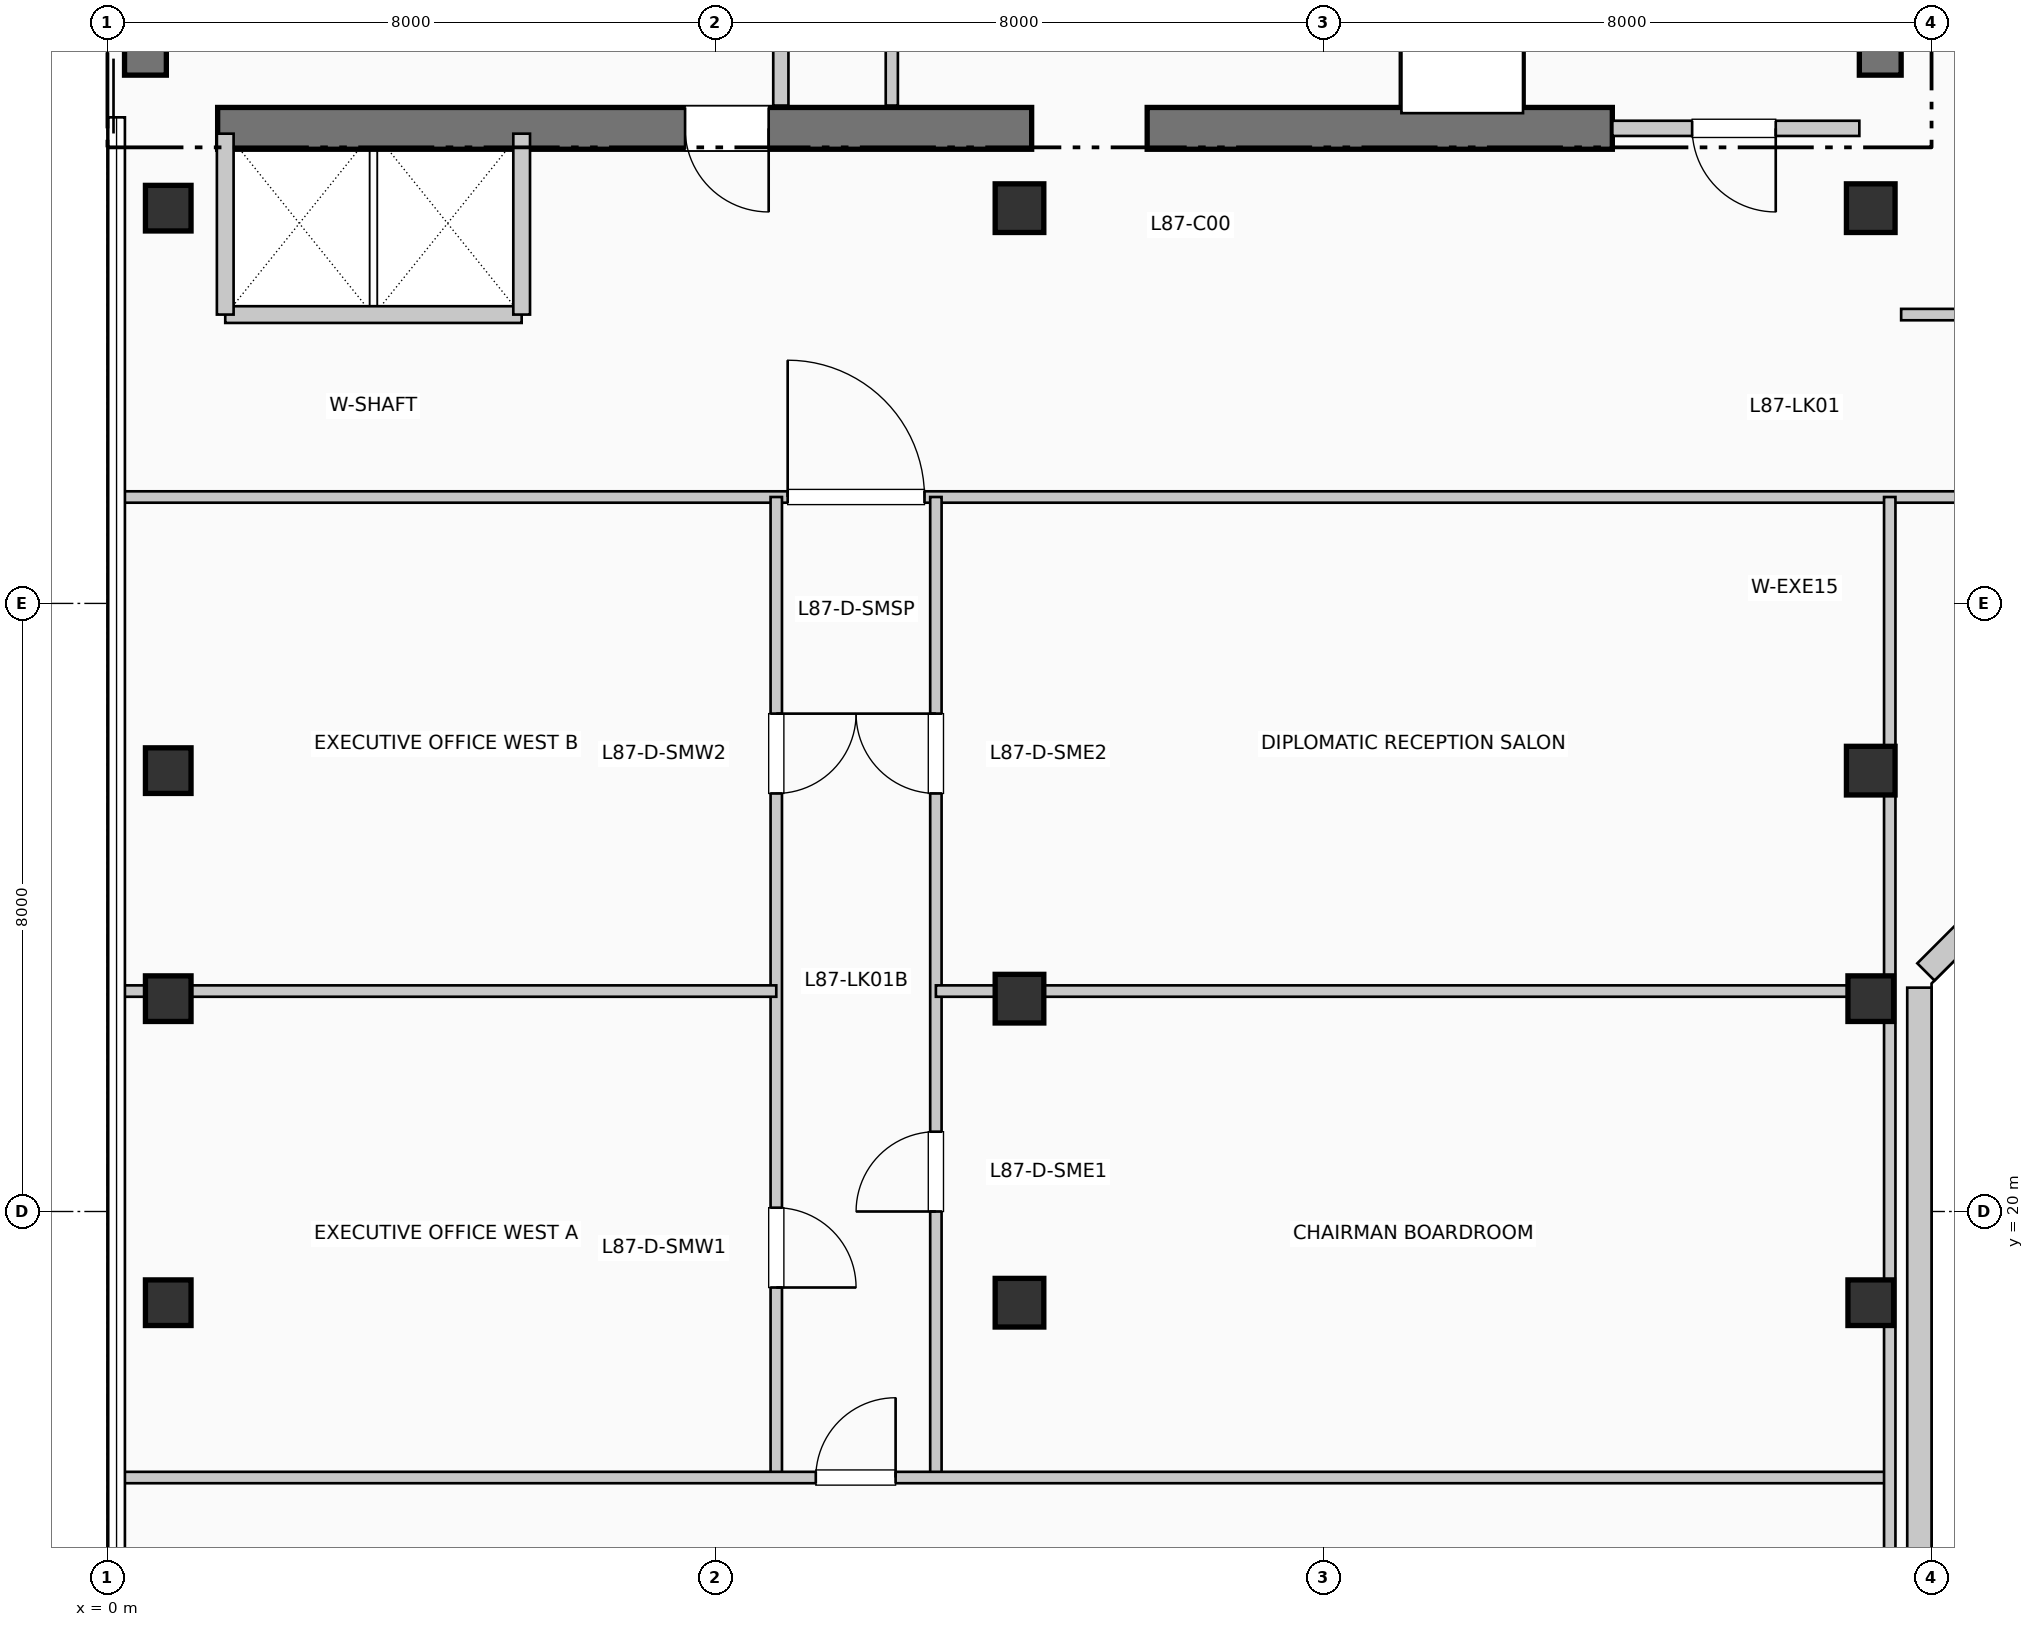
"""IFC4 building model, lengths in metres.
Left out: names, types, materials, properties, quantities, classifications, styles, units other than length and angle.
Written with IfcOpenShell. Run it as: python <this file> out.ifc"""

import sys

from ifc_helpers import new_model, si_unit, direction, frame, frame_2d, origin, origin_2d, place, context, subcontext, project, spatial, rectangle, extrude, element, fill, save


model = new_model("IFC4")
c1 = context("Model", 3, precision=1e-05, world=origin(), true_north=direction((0.0, 1.0)))
c2 = subcontext(c1, "Body", "Model", "MODEL_VIEW")
j1 = project(units=[si_unit("LENGTHUNIT", "METRE"), si_unit("PLANEANGLEUNIT", "RADIAN")], contexts=[c1])
p1 = place(None, origin())
s1 = spatial("IfcSite", under=j1, at=p1, CompositionType="ELEMENT")
p2 = place(p1, origin())
s2 = spatial("IfcBuilding", under=s1, at=p2, CompositionType="ELEMENT")
p3 = place(p2, frame((0.0, 0.0, 356.73)))
s3 = spatial("IfcBuildingStorey", under=s2, at=p3, CompositionType="ELEMENT", Elevation=356.73)
p4 = place(p3, frame((0.5, 34.95, 0.0), z_axis=(0.0, 0.0, 1.0), x_axis=(0.0, 1.0, 0.0)))
e1 = element("IfcWall", 1, at=p4, inside=s3, PredefinedType="SHEAR", context=c2, shape_type="SweptSolid", body=[
    extrude(rectangle(XDim=7.9, YDim=0.55, at=frame_2d((3.95, 0.0))), origin(), (0.0, 0.0, 1.0), 4.62),
])
p5 = place(p3, frame((23.325, 34.95, 0.0), z_axis=(0.0, 0.0, 1.0), x_axis=(0.0, 1.0, 0.0)))
e2 = element("IfcWall", 2, at=p5, inside=s3, PredefinedType="SHEAR", context=c2, shape_type="SweptSolid", body=[
    extrude(rectangle(XDim=10.64, YDim=0.55, at=frame_2d((5.32, 0.0))), origin(), (0.0, 0.0, 1.0), 4.62),
])
p6 = place(p3, frame((1.45, 34.25, 0.0), z_axis=(0.0, 0.0, 1.0), x_axis=(1.0, 0.0, 0.0)))
e3 = element("IfcWall", 3, at=p6, inside=s3, PredefinedType="SHEAR", context=c2, shape_type="SweptSolid", body=[
    extrude(rectangle(XDim=10.71, YDim=0.55, at=frame_2d((5.355, 0.0))), origin(), (0.0, 0.0, 1.0), 4.62),
])
p7 = place(p6, frame((7.25, 0.0, 0.0), z_axis=(0.0, 0.0, 1.0), x_axis=(-1.0, 0.0, 0.0)))
e4 = element("IfcOpeningElement", 4, at=p7, cuts=e3, PredefinedType="OPENING", context=c2, shape_type="SweptSolid", body=[
    extrude(rectangle(XDim=1.1, YDim=2.15, at=frame_2d((0.55, 1.075))), frame((0.0, 0.285, 0.0), z_axis=(0.0, -1.0, 0.0), x_axis=(1.0, 0.0, 0.0)), (0.0, 0.0, 1.0), 0.57),
])
p8 = place(p3, frame((13.68, 34.25, 0.0), z_axis=(0.0, 0.0, 1.0), x_axis=(1.0, 0.0, 0.0)))
e5 = element("IfcWall", 5, at=p8, inside=s3, PredefinedType="SHEAR", context=c2, shape_type="SweptSolid", body=[
    extrude(rectangle(XDim=6.12, YDim=0.55, at=frame_2d((3.06, 0.0))), origin(), (0.0, 0.0, 1.0), 4.62),
])
for number, where, z_axis, x_axis in (
    (6, (0.8, 18.8, 0.0), (0.0, 0.0, 1.0), (1.0, 0.0, 0.0)),
    (7, (0.8, 22.8, 0.0), (0.0, 0.0, 1.0), (1.0, 0.0, 0.0)),
    (8, (0.8, 25.8, 0.0), (0.0, 0.0, 1.0), (1.0, 0.0, 0.0)),
    (9, (0.8, 33.2, 0.0), (0.0, 0.0, 1.0), (1.0, 0.0, 0.0)),
):
    element("IfcColumn", number, at=place(p3, frame(where, z_axis=z_axis, x_axis=x_axis)), inside=s3, PredefinedType="COLUMN", context=c2, shape_type="SweptSolid", body=[
        extrude(rectangle(XDim=0.6, YDim=0.6, at=origin_2d()), origin(), (0.0, 0.0, 1.0), 4.62),
    ])
for number, where, z_axis, x_axis in (
    (10, (12.0, 18.8, 0.0), (0.0, 0.0, 1.0), (1.0, 0.0, 0.0)),
    (11, (12.0, 22.8, 0.0), (0.0, 0.0, 1.0), (1.0, 0.0, 0.0)),
    (12, (12.0, 33.2, 0.0), (0.0, 0.0, 1.0), (1.0, 0.0, 0.0)),
):
    element("IfcColumn", number, at=place(p3, frame(where, z_axis=z_axis, x_axis=x_axis)), inside=s3, PredefinedType="COLUMN", context=c2, shape_type="SweptSolid", body=[
        extrude(rectangle(XDim=0.64, YDim=0.64, at=origin_2d()), origin(), (0.0, 0.0, 1.0), 4.62),
    ])
for number, where, z_axis, x_axis in (
    (13, (23.2, 18.8, 0.0), (0.0, 0.0, 1.0), (1.0, 0.0, 0.0)),
    (14, (23.2, 22.8, 0.0), (0.0, 0.0, 1.0), (1.0, 0.0, 0.0)),
):
    element("IfcColumn", number, at=place(p3, frame(where, z_axis=z_axis, x_axis=x_axis)), inside=s3, PredefinedType="COLUMN", context=c2, shape_type="SweptSolid", body=[
        extrude(rectangle(XDim=0.6, YDim=0.6, at=origin_2d()), origin(), (0.0, 0.0, 1.0), 4.62),
    ])
for number, where, z_axis, x_axis in (
    (15, (23.2, 25.8, 0.0), (0.0, 0.0, 1.0), (1.0, 0.0, 0.0)),
    (16, (23.2, 33.2, 0.0), (0.0, 0.0, 1.0), (1.0, 0.0, 0.0)),
):
    element("IfcColumn", number, at=place(p3, frame(where, z_axis=z_axis, x_axis=x_axis)), inside=s3, PredefinedType="COLUMN", context=c2, shape_type="SweptSolid", body=[
        extrude(rectangle(XDim=0.64, YDim=0.64, at=origin_2d()), origin(), (0.0, 0.0, 1.0), 4.62),
    ])
p9 = place(p3, frame((23.84, 14.655, 0.0), z_axis=(0.0, 0.0, 1.0), x_axis=(0.0, 1.0, 0.0)))
e17 = element("IfcWall", 17, at=p9, inside=s3, PredefinedType="SOLIDWALL", context=c2, shape_type="SweptSolid", body=[
    extrude(rectangle(XDim=8.29, YDim=0.32, at=frame_2d((4.145, 0.0))), origin(), (0.0, 0.0, 1.0), 4.37),
])
p10 = place(p3, frame((23.926, 23.152, 0.0), z_axis=(0.0, 0.0, 1.0), x_axis=(0.707106781187, 0.707106781187, 0.0)))
e18 = element("IfcWall", 18, at=p10, inside=s3, PredefinedType="SOLIDWALL", context=c2, shape_type="SweptSolid", body=[
    extrude(rectangle(XDim=2.718, YDim=0.32, at=frame_2d((1.359, 0.0))), origin(), (0.0, 0.0, 1.0), 4.37),
])
p11 = place(p3, frame((8.86, 34.55, 0.0), z_axis=(0.0, 0.0, 1.0), x_axis=(0.0, 1.0, 0.0)))
e19 = element("IfcWall", 19, at=p11, inside=s3, PredefinedType="PARTITIONING", context=c2, shape_type="SweptSolid", body=[
    extrude(rectangle(XDim=2.5, YDim=0.2, at=frame_2d((1.25, 0.0))), origin(), (0.0, 0.0, 1.0), 4.37),
])
p12 = place(p3, frame((19.8, 34.25, 0.0), z_axis=(0.0, 0.0, 1.0), x_axis=(1.0, 0.0, 0.0)))
e20 = element("IfcWall", 20, at=p12, inside=s3, PredefinedType="PARTITIONING", context=c2, shape_type="SweptSolid", body=[
    extrude(rectangle(XDim=3.25, YDim=0.2, at=frame_2d((1.625, 0.0))), origin(), (0.0, 0.0, 1.0), 4.37),
])
p13 = place(p12, frame((2.15, 0.0, 0.0), z_axis=(0.0, 0.0, 1.0), x_axis=(-1.0, 0.0, 0.0)))
e21 = element("IfcOpeningElement", 21, at=p13, cuts=e20, PredefinedType="OPENING", context=c2, shape_type="SweptSolid", body=[
    extrude(rectangle(XDim=1.1, YDim=2.15, at=frame_2d((0.55, 1.075))), frame((0.0, 0.11, 0.0), z_axis=(0.0, -1.0, 0.0), x_axis=(1.0, 0.0, 0.0)), (0.0, 0.0, 1.0), 0.22),
])
p14 = place(p3, frame((1.55, 31.8, 0.0), z_axis=(0.0, 0.0, 1.0), x_axis=(1.0, 0.0, 0.0)))
e22 = element("IfcWall", 22, at=p14, inside=s3, PredefinedType="PARTITIONING", context=c2, shape_type="SweptSolid", body=[
    extrude(rectangle(XDim=3.9, YDim=0.22, at=frame_2d((1.95, 0.0))), origin(), (0.0, 0.0, 1.0), 4.37),
])
for number, where, z_axis, x_axis in (
    (23, (1.55, 31.8, 0.0), (0.0, 0.0, 1.0), (0.0, 1.0, 0.0)),
    (24, (5.45, 31.8, 0.0), (0.0, 0.0, 1.0), (0.0, 1.0, 0.0)),
):
    element("IfcWall", number, at=place(p3, frame(where, z_axis=z_axis, x_axis=x_axis)), inside=s3, PredefinedType="PARTITIONING", context=c2, shape_type="SweptSolid", body=[
        extrude(rectangle(XDim=2.38, YDim=0.22, at=frame_2d((1.19, 0.0))), origin(), (0.0, 0.0, 1.0), 4.37),
    ])
p15 = place(p3, frame((10.32, 34.55, 0.0), z_axis=(0.0, 0.0, 1.0), x_axis=(0.0, 1.0, 0.0)))
e25 = element("IfcWall", 25, at=p15, inside=s3, PredefinedType="PARTITIONING", context=c2, shape_type="SweptSolid", body=[
    extrude(rectangle(XDim=2.15, YDim=0.16, at=frame_2d((1.075, 0.0))), origin(), (0.0, 0.0, 1.0), 4.37),
])
p16 = place(p3, frame((0.19, 29.4, 0.0), z_axis=(0.0, 0.0, 1.0), x_axis=(1.0, 0.0, 0.0)))
e26 = element("IfcWall", 26, at=p16, inside=s3, PredefinedType="PARTITIONING", context=c2, shape_type="SweptSolid", body=[
    extrude(rectangle(XDim=44.02, YDim=0.15, at=frame_2d((22.01, 0.0))), origin(), (0.0, 0.0, 1.0), 4.055),
])
p17 = place(p16, frame((8.76, 0.0, 0.0)))
e27 = element("IfcOpeningElement", 27, at=p17, cuts=e26, PredefinedType="OPENING", context=c2, shape_type="SweptSolid", body=[
    extrude(rectangle(XDim=1.8, YDim=2.3, at=frame_2d((0.9, 1.15))), frame((0.0, 0.085, 0.0), z_axis=(0.0, -1.0, 0.0), x_axis=(1.0, 0.0, 0.0)), (0.0, 0.0, 1.0), 0.17),
])
p18 = place(p16, frame((25.91, 0.0, 0.0)))
e28 = element("IfcOpeningElement", 28, at=p18, cuts=e26, PredefinedType="OPENING", context=c2, shape_type="SweptSolid", body=[
    extrude(rectangle(XDim=1.05, YDim=2.15, at=frame_2d((0.525, 1.075))), frame((0.0, 0.085, 0.0), z_axis=(0.0, -1.0, 0.0), x_axis=(1.0, 0.0, 0.0)), (0.0, 0.0, 1.0), 0.17),
])
p19 = place(p16, frame((36.01, 0.0, 0.0)))
e29 = element("IfcOpeningElement", 29, at=p19, cuts=e26, PredefinedType="OPENING", context=c2, shape_type="SweptSolid", body=[
    extrude(rectangle(XDim=1.05, YDim=2.15, at=frame_2d((0.525, 1.075))), frame((0.0, 0.085, 0.0), z_axis=(0.0, -1.0, 0.0), x_axis=(1.0, 0.0, 0.0)), (0.0, 0.0, 1.0), 0.17),
])
p20 = place(p3, frame((23.6, 31.8, 0.0), z_axis=(0.0, 0.0, 1.0), x_axis=(1.0, 0.0, 0.0)))
e30 = element("IfcWall", 30, at=p20, inside=s3, PredefinedType="PARTITIONING", context=c2, shape_type="SweptSolid", body=[
    extrude(rectangle(XDim=20.61, YDim=0.15, at=frame_2d((10.305, 0.0))), origin(), (0.0, 0.0, 1.0), 4.37),
])
p21 = place(p20, frame((1.8, 0.0, 0.0)))
e31 = element("IfcOpeningElement", 31, at=p21, cuts=e30, PredefinedType="OPENING", context=c2, shape_type="SweptSolid", body=[
    extrude(rectangle(XDim=1.05, YDim=2.15, at=frame_2d((0.525, 1.075))), frame((0.0, 0.085, 0.0), z_axis=(0.0, -1.0, 0.0), x_axis=(1.0, 0.0, 0.0)), (0.0, 0.0, 1.0), 0.17),
])
p22 = place(p20, frame((8.85, 0.0, 0.0)))
e32 = element("IfcOpeningElement", 32, at=p22, cuts=e30, PredefinedType="OPENING", context=c2, shape_type="SweptSolid", body=[
    extrude(rectangle(XDim=1.05, YDim=2.15, at=frame_2d((0.525, 1.075))), frame((0.0, 0.085, 0.0), z_axis=(0.0, -1.0, 0.0), x_axis=(1.0, 0.0, 0.0)), (0.0, 0.0, 1.0), 0.17),
])
p23 = place(p20, frame((14.85, 0.0, 0.0)))
e33 = element("IfcOpeningElement", 33, at=p23, cuts=e30, PredefinedType="OPENING", context=c2, shape_type="SweptSolid", body=[
    extrude(rectangle(XDim=1.05, YDim=2.15, at=frame_2d((0.525, 1.075))), frame((0.0, 0.085, 0.0), z_axis=(0.0, -1.0, 0.0), x_axis=(1.0, 0.0, 0.0)), (0.0, 0.0, 1.0), 0.17),
])
p24 = place(p3, frame((8.8, 16.5, 0.0), z_axis=(0.0, 0.0, 1.0), x_axis=(0.0, 1.0, 0.0)))
e34 = element("IfcWall", 34, at=p24, inside=s3, PredefinedType="PARTITIONING", context=c2, shape_type="SweptSolid", body=[
    extrude(rectangle(XDim=12.9, YDim=0.15, at=frame_2d((6.45, 0.0))), origin(), (0.0, 0.0, 1.0), 4.37),
])
p25 = place(p24, frame((3.55, 0.0, 0.0), z_axis=(0.0, 0.0, 1.0), x_axis=(-1.0, 0.0, 0.0)))
e35 = element("IfcOpeningElement", 35, at=p25, cuts=e34, PredefinedType="OPENING", context=c2, shape_type="SweptSolid", body=[
    extrude(rectangle(XDim=1.05, YDim=2.15, at=frame_2d((0.525, 1.075))), frame((0.0, 0.085, 0.0), z_axis=(0.0, -1.0, 0.0), x_axis=(1.0, 0.0, 0.0)), (0.0, 0.0, 1.0), 0.17),
])
p26 = place(p24, frame((10.05, 0.0, 0.0), z_axis=(0.0, 0.0, 1.0), x_axis=(-1.0, 0.0, 0.0)))
e36 = element("IfcOpeningElement", 36, at=p26, cuts=e34, PredefinedType="OPENING", context=c2, shape_type="SweptSolid", body=[
    extrude(rectangle(XDim=1.05, YDim=2.15, at=frame_2d((0.525, 1.075))), frame((0.0, 0.085, 0.0), z_axis=(0.0, -1.0, 0.0), x_axis=(1.0, 0.0, 0.0)), (0.0, 0.0, 1.0), 0.17),
])
p27 = place(p3, frame((10.9, 16.5, 0.0), z_axis=(0.0, 0.0, 1.0), x_axis=(0.0, 1.0, 0.0)))
e37 = element("IfcWall", 37, at=p27, inside=s3, PredefinedType="PARTITIONING", context=c2, shape_type="SweptSolid", body=[
    extrude(rectangle(XDim=12.9, YDim=0.15, at=frame_2d((6.45, 0.0))), origin(), (0.0, 0.0, 1.0), 4.37),
])
p28 = place(p27, frame((3.5, 0.0, 0.0)))
e38 = element("IfcOpeningElement", 38, at=p28, cuts=e37, PredefinedType="OPENING", context=c2, shape_type="SweptSolid", body=[
    extrude(rectangle(XDim=1.05, YDim=2.15, at=frame_2d((0.525, 1.075))), frame((0.0, 0.085, 0.0), z_axis=(0.0, -1.0, 0.0), x_axis=(1.0, 0.0, 0.0)), (0.0, 0.0, 1.0), 0.17),
])
p29 = place(p27, frame((9.0, 0.0, 0.0)))
e39 = element("IfcOpeningElement", 39, at=p29, cuts=e37, PredefinedType="OPENING", context=c2, shape_type="SweptSolid", body=[
    extrude(rectangle(XDim=1.05, YDim=2.15, at=frame_2d((0.525, 1.075))), frame((0.0, 0.085, 0.0), z_axis=(0.0, -1.0, 0.0), x_axis=(1.0, 0.0, 0.0)), (0.0, 0.0, 1.0), 0.17),
])
p30 = place(p3, frame((0.19, 16.5, 0.0), z_axis=(0.0, 0.0, 1.0), x_axis=(1.0, 0.0, 0.0)))
e40 = element("IfcWall", 40, at=p30, inside=s3, PredefinedType="PARTITIONING", context=c2, shape_type="SweptSolid", body=[
    extrude(rectangle(XDim=23.26, YDim=0.15, at=frame_2d((11.63, 0.0))), origin(), (0.0, 0.0, 1.0), 4.37),
])
p31 = place(p30, frame((9.13, 0.0, 0.0)))
e41 = element("IfcOpeningElement", 41, at=p31, cuts=e40, PredefinedType="OPENING", context=c2, shape_type="SweptSolid", body=[
    extrude(rectangle(XDim=1.05, YDim=2.15, at=frame_2d((0.525, 1.075))), frame((0.0, 0.085, 0.0), z_axis=(0.0, -1.0, 0.0), x_axis=(1.0, 0.0, 0.0)), (0.0, 0.0, 1.0), 0.17),
])
p32 = place(p3, frame((23.45, 12.64, 0.0), z_axis=(0.0, 0.0, 1.0), x_axis=(0.0, 1.0, 0.0)))
e42 = element("IfcWall", 42, at=p32, inside=s3, PredefinedType="PARTITIONING", context=c2, shape_type="SweptSolid", body=[
    extrude(rectangle(XDim=16.76, YDim=0.15, at=frame_2d((8.38, 0.0))), origin(), (0.0, 0.0, 1.0), 3.855),
])
p33 = place(p3, frame((0.19, 22.9, 0.0), z_axis=(0.0, 0.0, 1.0), x_axis=(1.0, 0.0, 0.0)))
e43 = element("IfcWall", 43, at=p33, inside=s3, PredefinedType="PARTITIONING", context=c2, shape_type="SweptSolid", body=[
    extrude(rectangle(XDim=8.61, YDim=0.15, at=frame_2d((4.305, 0.0))), origin(), (0.0, 0.0, 1.0), 3.855),
])
p34 = place(p3, frame((10.9, 22.9, 0.0), z_axis=(0.0, 0.0, 1.0), x_axis=(1.0, 0.0, 0.0)))
e44 = element("IfcWall", 44, at=p34, inside=s3, PredefinedType="PARTITIONING", context=c2, shape_type="SweptSolid", body=[
    extrude(rectangle(XDim=12.55, YDim=0.15, at=frame_2d((6.275, 0.0))), origin(), (0.0, 0.0, 1.0), 3.855),
])
p35 = place(p7, origin())
e45 = element("IfcDoor", 45, at=p35, inside=s3, OperationType="SINGLE_SWING_RIGHT", PredefinedType="DOOR", context=c2, shape_type="SweptSolid", body=[
    extrude(rectangle(XDim=1.1, YDim=2.15, at=frame_2d((0.55, 1.075))), frame((0.0, 0.025, 0.0), z_axis=(0.0, -1.0, 0.0), x_axis=(1.0, 0.0, 0.0)), (0.0, 0.0, 1.0), 0.05),
])
fill(e4, e45)
p36 = place(p13, origin())
e46 = element("IfcDoor", 46, at=p36, inside=s3, OperationType="SINGLE_SWING_RIGHT", PredefinedType="DOOR", context=c2, shape_type="SweptSolid", body=[
    extrude(rectangle(XDim=1.1, YDim=2.15, at=frame_2d((0.55, 1.075))), frame((0.0, 0.025, 0.0), z_axis=(0.0, -1.0, 0.0), x_axis=(1.0, 0.0, 0.0)), (0.0, 0.0, 1.0), 0.05),
])
fill(e21, e46)
p37 = place(p17, origin())
e47 = element("IfcDoor", 47, at=p37, inside=s3, OperationType="SINGLE_SWING_LEFT", PredefinedType="DOOR", context=c2, shape_type="SweptSolid", body=[
    extrude(rectangle(XDim=1.8, YDim=2.3, at=frame_2d((0.9, 1.15))), frame((0.0, 0.025, 0.0), z_axis=(0.0, -1.0, 0.0), x_axis=(1.0, 0.0, 0.0)), (0.0, 0.0, 1.0), 0.05),
])
fill(e27, e47)
p38 = place(p31, origin())
e48 = element("IfcDoor", 48, at=p38, inside=s3, OperationType="SINGLE_SWING_RIGHT", PredefinedType="DOOR", context=c2, shape_type="SweptSolid", body=[
    extrude(rectangle(XDim=1.05, YDim=2.15, at=frame_2d((0.525, 1.075))), frame((0.0, 0.025, 0.0), z_axis=(0.0, -1.0, 0.0), x_axis=(1.0, 0.0, 0.0)), (0.0, 0.0, 1.0), 0.05),
])
fill(e41, e48)
p39 = place(p25, origin())
e49 = element("IfcDoor", 49, at=p39, inside=s3, OperationType="SINGLE_SWING_LEFT", PredefinedType="DOOR", context=c2, shape_type="SweptSolid", body=[
    extrude(rectangle(XDim=1.05, YDim=2.15, at=frame_2d((0.525, 1.075))), frame((0.0, 0.025, 0.0), z_axis=(0.0, -1.0, 0.0), x_axis=(1.0, 0.0, 0.0)), (0.0, 0.0, 1.0), 0.05),
])
fill(e35, e49)
p40 = place(p26, origin())
e50 = element("IfcDoor", 50, at=p40, inside=s3, OperationType="SINGLE_SWING_RIGHT", PredefinedType="DOOR", context=c2, shape_type="SweptSolid", body=[
    extrude(rectangle(XDim=1.05, YDim=2.15, at=frame_2d((0.525, 1.075))), frame((0.0, 0.025, 0.0), z_axis=(0.0, -1.0, 0.0), x_axis=(1.0, 0.0, 0.0)), (0.0, 0.0, 1.0), 0.05),
])
fill(e36, e50)
p41 = place(p28, origin())
e51 = element("IfcDoor", 51, at=p41, inside=s3, OperationType="SINGLE_SWING_LEFT", PredefinedType="DOOR", context=c2, shape_type="SweptSolid", body=[
    extrude(rectangle(XDim=1.05, YDim=2.15, at=frame_2d((0.525, 1.075))), frame((0.0, 0.025, 0.0), z_axis=(0.0, -1.0, 0.0), x_axis=(1.0, 0.0, 0.0)), (0.0, 0.0, 1.0), 0.05),
])
fill(e38, e51)
p42 = place(p29, origin())
e52 = element("IfcDoor", 52, at=p42, inside=s3, OperationType="SINGLE_SWING_RIGHT", PredefinedType="DOOR", context=c2, shape_type="SweptSolid", body=[
    extrude(rectangle(XDim=1.05, YDim=2.15, at=frame_2d((0.525, 1.075))), frame((0.0, 0.025, 0.0), z_axis=(0.0, -1.0, 0.0), x_axis=(1.0, 0.0, 0.0)), (0.0, 0.0, 1.0), 0.05),
])
fill(e39, e52)
save(model, sys.argv[1])
